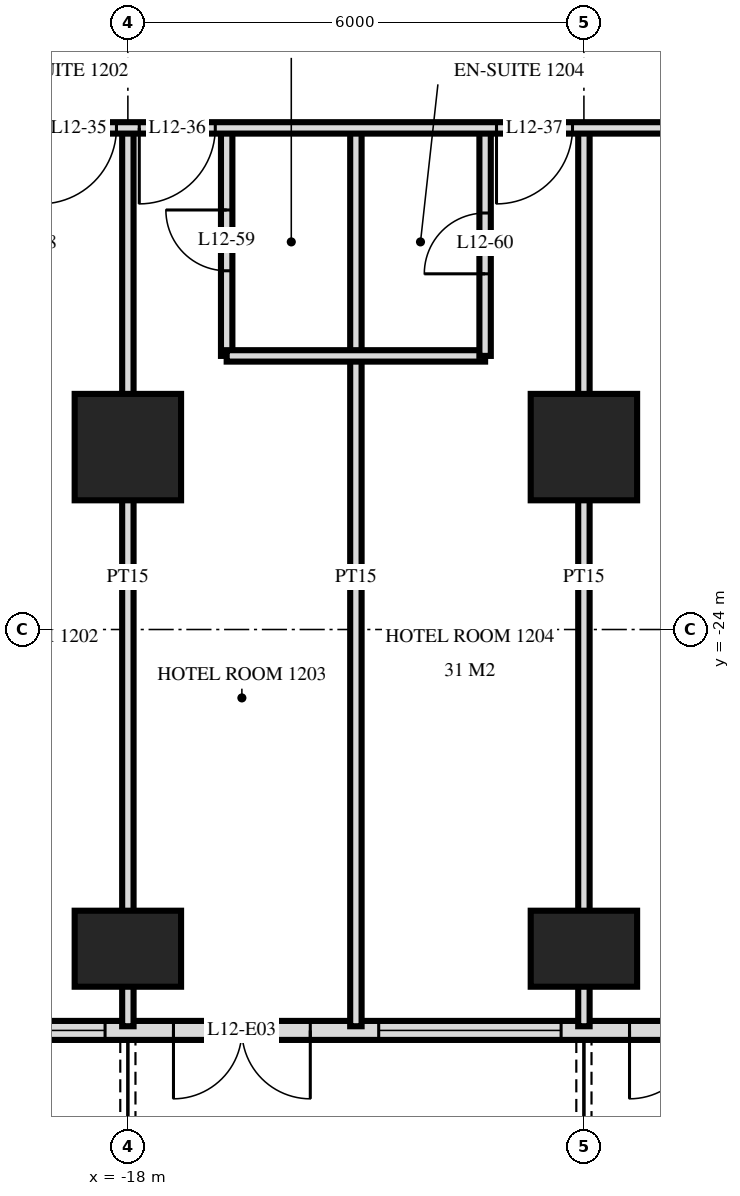
"""IFC4 building model, lengths in metres.
Left out: names, types, materials, properties, quantities, classifications, styles, units other than length and angle.
Written with IfcOpenShell. Run it as: python <this file> out.ifc"""

import sys

from ifc_helpers import new_model, si_unit, direction, frame, frame_2d, origin, origin_2d, place, context, subcontext, project, spatial, rectangle, extrude, element, fill, save


model = new_model("IFC4")
c1 = context("Model", 3, precision=1e-05, world=origin(), true_north=direction((0.0, 1.0)))
c2 = subcontext(c1, "Body", "Model", "MODEL_VIEW")
j1 = project(units=[si_unit("LENGTHUNIT", "METRE"), si_unit("PLANEANGLEUNIT", "RADIAN")], contexts=[c1])
p1 = place(None, origin())
s1 = spatial("IfcSite", under=j1, at=p1, CompositionType="ELEMENT")
p2 = place(p1, origin())
s2 = spatial("IfcBuilding", under=s1, at=p2, CompositionType="ELEMENT")
p3 = place(p2, frame((0.0, 0.0, 52.8)))
s3 = spatial("IfcBuildingStorey", under=s2, at=p3, CompositionType="ELEMENT", Elevation=52.8)
p4 = place(p3, frame((-18.0, -28.2, 0.0), z_axis=(0.0, 0.0, 1.0), x_axis=(1.0, 0.0, 0.0)))
e1 = element("IfcColumn", 1, at=p4, inside=s3, PredefinedType="COLUMN", context=c2, shape_type="SweptSolid", body=[
    extrude(rectangle(XDim=1.4, YDim=1.0, at=origin_2d()), origin(), (0.0, 0.0, 1.0), 3.6),
])
p5 = place(p3, frame((-18.0, -21.6, 0.0), z_axis=(0.0, 0.0, 1.0), x_axis=(1.0, 0.0, 0.0)))
e2 = element("IfcColumn", 2, at=p5, inside=s3, PredefinedType="COLUMN", context=c2, shape_type="SweptSolid", body=[
    extrude(rectangle(XDim=1.4, YDim=1.4, at=origin_2d()), origin(), (0.0, 0.0, 1.0), 3.6),
])
p6 = place(p3, frame((-12.0, -28.2, 0.0), z_axis=(0.0, 0.0, 1.0), x_axis=(1.0, 0.0, 0.0)))
e3 = element("IfcColumn", 3, at=p6, inside=s3, PredefinedType="COLUMN", context=c2, shape_type="SweptSolid", body=[
    extrude(rectangle(XDim=1.4, YDim=1.0, at=origin_2d()), origin(), (0.0, 0.0, 1.0), 3.6),
])
p7 = place(p3, frame((-12.0, -21.6, 0.0), z_axis=(0.0, 0.0, 1.0), x_axis=(1.0, 0.0, 0.0)))
e4 = element("IfcColumn", 4, at=p7, inside=s3, PredefinedType="COLUMN", context=c2, shape_type="SweptSolid", body=[
    extrude(rectangle(XDim=1.4, YDim=1.4, at=origin_2d()), origin(), (0.0, 0.0, 1.0), 3.6),
])
p8 = place(p3, frame((-28.775, -29.275, 0.0), z_axis=(0.0, 0.0, 1.0), x_axis=(1.0, 0.0, 0.0)))
e5 = element("IfcWall", 5, at=p8, inside=s3, PredefinedType="SOLIDWALL", context=c2, shape_type="SweptSolid", body=[
    extrude(rectangle(XDim=57.551, YDim=0.25, at=frame_2d((28.775, 0.0))), origin(), (0.0, 0.0, 1.0), 3.32),
])
p9 = place(p8, frame((0.575, 0.0, 0.0)))
e6 = element("IfcOpeningElement", 6, at=p9, cuts=e5, PredefinedType="OPENING", context=c2, shape_type="SweptSolid", body=[
    extrude(rectangle(XDim=1.8, YDim=2.4, at=frame_2d((0.9, 1.2))), frame((0.0, 0.135, 0.0), z_axis=(0.0, -1.0, 0.0), x_axis=(1.0, 0.0, 0.0)), (0.0, 0.0, 1.0), 0.27),
])
p10 = place(p8, frame((5.375, 0.0, 0.0)))
e7 = element("IfcOpeningElement", 7, at=p10, cuts=e5, PredefinedType="OPENING", context=c2, shape_type="SweptSolid", body=[
    extrude(rectangle(XDim=1.8, YDim=2.4, at=frame_2d((0.9, 1.2))), frame((0.0, 0.135, 0.0), z_axis=(0.0, -1.0, 0.0), x_axis=(1.0, 0.0, 0.0)), (0.0, 0.0, 1.0), 0.27),
])
p11 = place(p8, frame((8.075, 0.0, 0.3)))
e8 = element("IfcOpeningElement", 8, at=p11, cuts=e5, PredefinedType="OPENING", context=c2, shape_type="SweptSolid", body=[
    extrude(rectangle(XDim=2.4, YDim=2.1, at=frame_2d((1.2, 1.05))), frame((0.0, 0.135, 0.0), z_axis=(0.0, -1.0, 0.0), x_axis=(1.0, 0.0, 0.0)), (0.0, 0.0, 1.0), 0.27),
])
p12 = place(p8, frame((11.375, 0.0, 0.0)))
e9 = element("IfcOpeningElement", 9, at=p12, cuts=e5, PredefinedType="OPENING", context=c2, shape_type="SweptSolid", body=[
    extrude(rectangle(XDim=1.8, YDim=2.4, at=frame_2d((0.9, 1.2))), frame((0.0, 0.135, 0.0), z_axis=(0.0, -1.0, 0.0), x_axis=(1.0, 0.0, 0.0)), (0.0, 0.0, 1.0), 0.27),
])
p13 = place(p8, frame((14.075, 0.0, 0.3)))
e10 = element("IfcOpeningElement", 10, at=p13, cuts=e5, PredefinedType="OPENING", context=c2, shape_type="SweptSolid", body=[
    extrude(rectangle(XDim=2.4, YDim=2.1, at=frame_2d((1.2, 1.05))), frame((0.0, 0.135, 0.0), z_axis=(0.0, -1.0, 0.0), x_axis=(1.0, 0.0, 0.0)), (0.0, 0.0, 1.0), 0.27),
])
p14 = place(p8, frame((17.375, 0.0, 0.0)))
e11 = element("IfcOpeningElement", 11, at=p14, cuts=e5, PredefinedType="OPENING", context=c2, shape_type="SweptSolid", body=[
    extrude(rectangle(XDim=1.8, YDim=2.4, at=frame_2d((0.9, 1.2))), frame((0.0, 0.135, 0.0), z_axis=(0.0, -1.0, 0.0), x_axis=(1.0, 0.0, 0.0)), (0.0, 0.0, 1.0), 0.27),
])
p15 = place(p8, frame((20.075, 0.0, 0.3)))
e12 = element("IfcOpeningElement", 12, at=p15, cuts=e5, PredefinedType="OPENING", context=c2, shape_type="SweptSolid", body=[
    extrude(rectangle(XDim=2.4, YDim=2.1, at=frame_2d((1.2, 1.05))), frame((0.0, 0.135, 0.0), z_axis=(0.0, -1.0, 0.0), x_axis=(1.0, 0.0, 0.0)), (0.0, 0.0, 1.0), 0.27),
])
p16 = place(p8, frame((23.075, 0.0, 0.3)))
e13 = element("IfcOpeningElement", 13, at=p16, cuts=e5, PredefinedType="OPENING", context=c2, shape_type="SweptSolid", body=[
    extrude(rectangle(XDim=2.4, YDim=2.1, at=frame_2d((1.2, 1.05))), frame((0.0, 0.135, 0.0), z_axis=(0.0, -1.0, 0.0), x_axis=(1.0, 0.0, 0.0)), (0.0, 0.0, 1.0), 0.27),
])
p17 = place(p8, frame((26.375, 0.0, 0.0)))
e14 = element("IfcOpeningElement", 14, at=p17, cuts=e5, PredefinedType="OPENING", context=c2, shape_type="SweptSolid", body=[
    extrude(rectangle(XDim=1.8, YDim=2.4, at=frame_2d((0.9, 1.2))), frame((0.0, 0.135, 0.0), z_axis=(0.0, -1.0, 0.0), x_axis=(1.0, 0.0, 0.0)), (0.0, 0.0, 1.0), 0.27),
])
p18 = place(p8, frame((29.375, 0.0, 0.0)))
e15 = element("IfcOpeningElement", 15, at=p18, cuts=e5, PredefinedType="OPENING", context=c2, shape_type="SweptSolid", body=[
    extrude(rectangle(XDim=1.8, YDim=2.4, at=frame_2d((0.9, 1.2))), frame((0.0, 0.135, 0.0), z_axis=(0.0, -1.0, 0.0), x_axis=(1.0, 0.0, 0.0)), (0.0, 0.0, 1.0), 0.27),
])
p19 = place(p8, frame((32.075, 0.0, 0.3)))
e16 = element("IfcOpeningElement", 16, at=p19, cuts=e5, PredefinedType="OPENING", context=c2, shape_type="SweptSolid", body=[
    extrude(rectangle(XDim=2.4, YDim=2.1, at=frame_2d((1.2, 1.05))), frame((0.0, 0.135, 0.0), z_axis=(0.0, -1.0, 0.0), x_axis=(1.0, 0.0, 0.0)), (0.0, 0.0, 1.0), 0.27),
])
p20 = place(p8, frame((35.075, 0.0, 0.3)))
e17 = element("IfcOpeningElement", 17, at=p20, cuts=e5, PredefinedType="OPENING", context=c2, shape_type="SweptSolid", body=[
    extrude(rectangle(XDim=2.4, YDim=2.1, at=frame_2d((1.2, 1.05))), frame((0.0, 0.135, 0.0), z_axis=(0.0, -1.0, 0.0), x_axis=(1.0, 0.0, 0.0)), (0.0, 0.0, 1.0), 0.27),
])
p21 = place(p8, frame((38.375, 0.0, 0.0)))
e18 = element("IfcOpeningElement", 18, at=p21, cuts=e5, PredefinedType="OPENING", context=c2, shape_type="SweptSolid", body=[
    extrude(rectangle(XDim=1.8, YDim=2.4, at=frame_2d((0.9, 1.2))), frame((0.0, 0.135, 0.0), z_axis=(0.0, -1.0, 0.0), x_axis=(1.0, 0.0, 0.0)), (0.0, 0.0, 1.0), 0.27),
])
p22 = place(p8, frame((41.375, 0.0, 0.0)))
e19 = element("IfcOpeningElement", 19, at=p22, cuts=e5, PredefinedType="OPENING", context=c2, shape_type="SweptSolid", body=[
    extrude(rectangle(XDim=1.8, YDim=2.4, at=frame_2d((0.9, 1.2))), frame((0.0, 0.135, 0.0), z_axis=(0.0, -1.0, 0.0), x_axis=(1.0, 0.0, 0.0)), (0.0, 0.0, 1.0), 0.27),
])
p23 = place(p8, frame((44.075, 0.0, 0.3)))
e20 = element("IfcOpeningElement", 20, at=p23, cuts=e5, PredefinedType="OPENING", context=c2, shape_type="SweptSolid", body=[
    extrude(rectangle(XDim=2.4, YDim=2.1, at=frame_2d((1.2, 1.05))), frame((0.0, 0.135, 0.0), z_axis=(0.0, -1.0, 0.0), x_axis=(1.0, 0.0, 0.0)), (0.0, 0.0, 1.0), 0.27),
])
p24 = place(p8, frame((47.075, 0.0, 0.3)))
e21 = element("IfcOpeningElement", 21, at=p24, cuts=e5, PredefinedType="OPENING", context=c2, shape_type="SweptSolid", body=[
    extrude(rectangle(XDim=2.4, YDim=2.1, at=frame_2d((1.2, 1.05))), frame((0.0, 0.135, 0.0), z_axis=(0.0, -1.0, 0.0), x_axis=(1.0, 0.0, 0.0)), (0.0, 0.0, 1.0), 0.27),
])
p25 = place(p8, frame((50.375, 0.0, 0.0)))
e22 = element("IfcOpeningElement", 22, at=p25, cuts=e5, PredefinedType="OPENING", context=c2, shape_type="SweptSolid", body=[
    extrude(rectangle(XDim=1.8, YDim=2.4, at=frame_2d((0.9, 1.2))), frame((0.0, 0.135, 0.0), z_axis=(0.0, -1.0, 0.0), x_axis=(1.0, 0.0, 0.0)), (0.0, 0.0, 1.0), 0.27),
])
p26 = place(p8, frame((53.375, 0.0, 0.0)))
e23 = element("IfcOpeningElement", 23, at=p26, cuts=e5, PredefinedType="OPENING", context=c2, shape_type="SweptSolid", body=[
    extrude(rectangle(XDim=1.8, YDim=2.4, at=frame_2d((0.9, 1.2))), frame((0.0, 0.135, 0.0), z_axis=(0.0, -1.0, 0.0), x_axis=(1.0, 0.0, 0.0)), (0.0, 0.0, 1.0), 0.27),
])
p27 = place(p3, frame((-12.0, -29.22, 0.0), z_axis=(0.0, 0.0, 1.0), x_axis=(0.0, 1.0, 0.0)))
e24 = element("IfcWall", 24, at=p27, inside=s3, PredefinedType="PARTITIONING", context=c2, shape_type="SweptSolid", body=[
    extrude(rectangle(XDim=11.82, YDim=0.15, at=frame_2d((5.91, 0.0))), origin(), (0.0, 0.0, 1.0), 3.32),
])
p28 = place(p3, frame((-13.3, -20.4, 0.0), z_axis=(0.0, 0.0, 1.0), x_axis=(0.0, 1.0, 0.0)))
e25 = element("IfcWall", 25, at=p28, inside=s3, PredefinedType="PARTITIONING", context=c2, shape_type="SweptSolid", body=[
    extrude(rectangle(XDim=3.0, YDim=0.15, at=frame_2d((1.5, 0.0))), origin(), (0.0, 0.0, 1.0), 3.32),
])
p29 = place(p28, frame((1.08, 0.0, 0.0)))
e26 = element("IfcOpeningElement", 26, at=p29, cuts=e25, PredefinedType="OPENING", context=c2, shape_type="SweptSolid", body=[
    extrude(rectangle(XDim=0.8, YDim=2.1, at=frame_2d((0.4, 1.05))), frame((0.0, 0.085, 0.0), z_axis=(0.0, -1.0, 0.0), x_axis=(1.0, 0.0, 0.0)), (0.0, 0.0, 1.0), 0.17),
])
p30 = place(p3, frame((-15.0, -29.22, 0.0), z_axis=(0.0, 0.0, 1.0), x_axis=(0.0, 1.0, 0.0)))
e27 = element("IfcWall", 27, at=p30, inside=s3, PredefinedType="PARTITIONING", context=c2, shape_type="SweptSolid", body=[
    extrude(rectangle(XDim=11.82, YDim=0.15, at=frame_2d((5.91, 0.0))), origin(), (0.0, 0.0, 1.0), 3.32),
])
p31 = place(p3, frame((-16.7, -20.4, 0.0), z_axis=(0.0, 0.0, 1.0), x_axis=(0.0, 1.0, 0.0)))
e28 = element("IfcWall", 28, at=p31, inside=s3, PredefinedType="PARTITIONING", context=c2, shape_type="SweptSolid", body=[
    extrude(rectangle(XDim=3.0, YDim=0.15, at=frame_2d((1.5, 0.0))), origin(), (0.0, 0.0, 1.0), 3.32),
])
p32 = place(p31, frame((1.12, 0.0, 0.0)))
e29 = element("IfcOpeningElement", 29, at=p32, cuts=e28, PredefinedType="OPENING", context=c2, shape_type="SweptSolid", body=[
    extrude(rectangle(XDim=0.8, YDim=2.1, at=frame_2d((0.4, 1.05))), frame((0.0, 0.085, 0.0), z_axis=(0.0, -1.0, 0.0), x_axis=(1.0, 0.0, 0.0)), (0.0, 0.0, 1.0), 0.17),
])
p33 = place(p3, frame((-18.0, -29.22, 0.0), z_axis=(0.0, 0.0, 1.0), x_axis=(0.0, 1.0, 0.0)))
e30 = element("IfcWall", 30, at=p33, inside=s3, PredefinedType="PARTITIONING", context=c2, shape_type="SweptSolid", body=[
    extrude(rectangle(XDim=11.82, YDim=0.15, at=frame_2d((5.91, 0.0))), origin(), (0.0, 0.0, 1.0), 3.32),
])
p34 = place(p3, frame((-16.7, -20.4, 0.0), z_axis=(0.0, 0.0, 1.0), x_axis=(1.0, 0.0, 0.0)))
e31 = element("IfcWall", 31, at=p34, inside=s3, PredefinedType="PARTITIONING", context=c2, shape_type="SweptSolid", body=[
    extrude(rectangle(XDim=3.4, YDim=0.15, at=frame_2d((1.7, 0.0))), origin(), (0.0, 0.0, 1.0), 3.32),
])
p35 = place(p3, frame((-33.12, -17.4, 0.0), z_axis=(0.0, 0.0, 1.0), x_axis=(1.0, 0.0, 0.0)))
e32 = element("IfcWall", 32, at=p35, inside=s3, PredefinedType="PARTITIONING", context=c2, shape_type="SweptSolid", body=[
    extrude(rectangle(XDim=66.24, YDim=0.15, at=frame_2d((33.12, 0.0))), origin(), (0.0, 0.0, 1.0), 3.32),
])
p36 = place(p35, frame((9.27, 0.0, 0.0)))
e33 = element("IfcOpeningElement", 33, at=p36, cuts=e32, PredefinedType="OPENING", context=c2, shape_type="SweptSolid", body=[
    extrude(rectangle(XDim=1.0, YDim=2.1, at=frame_2d((0.5, 1.05))), frame((0.0, 0.085, 0.0), z_axis=(0.0, -1.0, 0.0), x_axis=(1.0, 0.0, 0.0)), (0.0, 0.0, 1.0), 0.17),
])
p37 = place(p35, frame((13.97, 0.0, 0.0)))
e34 = element("IfcOpeningElement", 34, at=p37, cuts=e32, PredefinedType="OPENING", context=c2, shape_type="SweptSolid", body=[
    extrude(rectangle(XDim=1.0, YDim=2.1, at=frame_2d((0.5, 1.05))), frame((0.0, 0.085, 0.0), z_axis=(0.0, -1.0, 0.0), x_axis=(1.0, 0.0, 0.0)), (0.0, 0.0, 1.0), 0.17),
])
p38 = place(p35, frame((15.27, 0.0, 0.0)))
e35 = element("IfcOpeningElement", 35, at=p38, cuts=e32, PredefinedType="OPENING", context=c2, shape_type="SweptSolid", body=[
    extrude(rectangle(XDim=1.0, YDim=2.1, at=frame_2d((0.5, 1.05))), frame((0.0, 0.085, 0.0), z_axis=(0.0, -1.0, 0.0), x_axis=(1.0, 0.0, 0.0)), (0.0, 0.0, 1.0), 0.17),
])
p39 = place(p35, frame((19.97, 0.0, 0.0)))
e36 = element("IfcOpeningElement", 36, at=p39, cuts=e32, PredefinedType="OPENING", context=c2, shape_type="SweptSolid", body=[
    extrude(rectangle(XDim=1.0, YDim=2.1, at=frame_2d((0.5, 1.05))), frame((0.0, 0.085, 0.0), z_axis=(0.0, -1.0, 0.0), x_axis=(1.0, 0.0, 0.0)), (0.0, 0.0, 1.0), 0.17),
])
p40 = place(p35, frame((22.27, 0.0, 0.0)))
e37 = element("IfcOpeningElement", 37, at=p40, cuts=e32, PredefinedType="OPENING", context=c2, shape_type="SweptSolid", body=[
    extrude(rectangle(XDim=1.0, YDim=2.1, at=frame_2d((0.5, 1.05))), frame((0.0, 0.085, 0.0), z_axis=(0.0, -1.0, 0.0), x_axis=(1.0, 0.0, 0.0)), (0.0, 0.0, 1.0), 0.17),
])
p41 = place(p35, frame((28.97, 0.0, 0.0)))
e38 = element("IfcOpeningElement", 38, at=p41, cuts=e32, PredefinedType="OPENING", context=c2, shape_type="SweptSolid", body=[
    extrude(rectangle(XDim=1.0, YDim=2.1, at=frame_2d((0.5, 1.05))), frame((0.0, 0.085, 0.0), z_axis=(0.0, -1.0, 0.0), x_axis=(1.0, 0.0, 0.0)), (0.0, 0.0, 1.0), 0.17),
])
p42 = place(p35, frame((30.27, 0.0, 0.0)))
e39 = element("IfcOpeningElement", 39, at=p42, cuts=e32, PredefinedType="OPENING", context=c2, shape_type="SweptSolid", body=[
    extrude(rectangle(XDim=1.0, YDim=2.1, at=frame_2d((0.5, 1.05))), frame((0.0, 0.085, 0.0), z_axis=(0.0, -1.0, 0.0), x_axis=(1.0, 0.0, 0.0)), (0.0, 0.0, 1.0), 0.17),
])
p43 = place(p35, frame((34.97, 0.0, 0.0)))
e40 = element("IfcOpeningElement", 40, at=p43, cuts=e32, PredefinedType="OPENING", context=c2, shape_type="SweptSolid", body=[
    extrude(rectangle(XDim=1.0, YDim=2.1, at=frame_2d((0.5, 1.05))), frame((0.0, 0.085, 0.0), z_axis=(0.0, -1.0, 0.0), x_axis=(1.0, 0.0, 0.0)), (0.0, 0.0, 1.0), 0.17),
])
p44 = place(p35, frame((36.27, 0.0, 0.0)))
e41 = element("IfcOpeningElement", 41, at=p44, cuts=e32, PredefinedType="OPENING", context=c2, shape_type="SweptSolid", body=[
    extrude(rectangle(XDim=1.0, YDim=2.1, at=frame_2d((0.5, 1.05))), frame((0.0, 0.085, 0.0), z_axis=(0.0, -1.0, 0.0), x_axis=(1.0, 0.0, 0.0)), (0.0, 0.0, 1.0), 0.17),
])
p45 = place(p35, frame((39.82, 0.0, 0.0)))
e42 = element("IfcOpeningElement", 42, at=p45, cuts=e32, PredefinedType="OPENING", context=c2, shape_type="SweptSolid", body=[
    extrude(rectangle(XDim=1.0, YDim=2.1, at=frame_2d((0.5, 1.05))), frame((0.0, 0.085, 0.0), z_axis=(0.0, -1.0, 0.0), x_axis=(1.0, 0.0, 0.0)), (0.0, 0.0, 1.0), 0.17),
])
p46 = place(p35, frame((51.27, 0.0, 0.0)))
e43 = element("IfcOpeningElement", 43, at=p46, cuts=e32, PredefinedType="OPENING", context=c2, shape_type="SweptSolid", body=[
    extrude(rectangle(XDim=1.0, YDim=2.1, at=frame_2d((0.5, 1.05))), frame((0.0, 0.085, 0.0), z_axis=(0.0, -1.0, 0.0), x_axis=(1.0, 0.0, 0.0)), (0.0, 0.0, 1.0), 0.17),
])
p47 = place(p35, frame((4.42, 0.0, 0.0)))
e44 = element("IfcOpeningElement", 44, at=p47, cuts=e32, PredefinedType="OPENING", context=c2, shape_type="SweptSolid", body=[
    extrude(rectangle(XDim=1.0, YDim=2.1, at=frame_2d((0.5, 1.05))), frame((0.0, 0.085, 0.0), z_axis=(0.0, -1.0, 0.0), x_axis=(1.0, 0.0, 0.0)), (0.0, 0.0, 1.0), 0.17),
])
p48 = place(p35, frame((54.82, 0.0, 0.0)))
e45 = element("IfcOpeningElement", 45, at=p48, cuts=e32, PredefinedType="OPENING", context=c2, shape_type="SweptSolid", body=[
    extrude(rectangle(XDim=1.0, YDim=2.1, at=frame_2d((0.5, 1.05))), frame((0.0, 0.085, 0.0), z_axis=(0.0, -1.0, 0.0), x_axis=(1.0, 0.0, 0.0)), (0.0, 0.0, 1.0), 0.17),
])
p49 = place(p11, origin())
e46 = element("IfcWindow", 46, at=p49, inside=s3, PartitioningType="SINGLE_PANEL", PredefinedType="WINDOW", context=c2, shape_type="SweptSolid", body=[
    extrude(rectangle(XDim=2.4, YDim=2.1, at=frame_2d((1.2, 1.05))), frame((0.0, 0.03, 0.0), z_axis=(0.0, -1.0, 0.0), x_axis=(1.0, 0.0, 0.0)), (0.0, 0.0, 1.0), 0.06),
])
fill(e8, e46)
p50 = place(p12, frame((0.9, 0.0, 0.0), z_axis=(0.0, 0.0, 1.0), x_axis=(-1.0, 0.0, 0.0)))
e47 = element("IfcDoor", 47, at=p50, inside=s3, OperationType="DOUBLE_DOOR_SINGLE_SWING", PredefinedType="DOOR", context=c2, shape_type="SweptSolid", body=[
    extrude(rectangle(XDim=1.8, YDim=2.4, at=frame_2d((0.0, 1.2))), frame((0.0, -0.025, 0.0), z_axis=(0.0, 1.0, 0.0), x_axis=(-1.0, 0.0, 0.0)), (0.0, 0.0, 1.0), 0.05),
])
fill(e9, e47)
p51 = place(p13, origin())
e48 = element("IfcWindow", 48, at=p51, inside=s3, PartitioningType="SINGLE_PANEL", PredefinedType="WINDOW", context=c2, shape_type="SweptSolid", body=[
    extrude(rectangle(XDim=2.4, YDim=2.1, at=frame_2d((1.2, 1.05))), frame((0.0, 0.03, 0.0), z_axis=(0.0, -1.0, 0.0), x_axis=(1.0, 0.0, 0.0)), (0.0, 0.0, 1.0), 0.06),
])
fill(e10, e48)
p52 = place(p14, frame((0.9, 0.0, 0.0), z_axis=(0.0, 0.0, 1.0), x_axis=(-1.0, 0.0, 0.0)))
e49 = element("IfcDoor", 49, at=p52, inside=s3, OperationType="DOUBLE_DOOR_SINGLE_SWING", PredefinedType="DOOR", context=c2, shape_type="SweptSolid", body=[
    extrude(rectangle(XDim=1.8, YDim=2.4, at=frame_2d((0.0, 1.2))), frame((0.0, -0.025, 0.0), z_axis=(0.0, 1.0, 0.0), x_axis=(-1.0, 0.0, 0.0)), (0.0, 0.0, 1.0), 0.05),
])
fill(e11, e49)
p53 = place(p37, frame((0.5, 0.0, 0.0), z_axis=(0.0, 0.0, 1.0), x_axis=(-1.0, 0.0, 0.0)))
e50 = element("IfcDoor", 50, at=p53, inside=s3, OperationType="SINGLE_SWING_LEFT", PredefinedType="DOOR", context=c2, shape_type="SweptSolid", body=[
    extrude(rectangle(XDim=1.0, YDim=2.1, at=frame_2d((0.0, 1.05))), frame((0.0, -0.025, 0.0), z_axis=(0.0, 1.0, 0.0), x_axis=(-1.0, 0.0, 0.0)), (0.0, 0.0, 1.0), 0.05),
])
fill(e34, e50)
p54 = place(p38, frame((0.5, 0.0, 0.0), z_axis=(0.0, 0.0, 1.0), x_axis=(-1.0, 0.0, 0.0)))
e51 = element("IfcDoor", 51, at=p54, inside=s3, OperationType="SINGLE_SWING_LEFT", PredefinedType="DOOR", context=c2, shape_type="SweptSolid", body=[
    extrude(rectangle(XDim=1.0, YDim=2.1, at=frame_2d((0.0, 1.05))), frame((0.0, -0.025, 0.0), z_axis=(0.0, 1.0, 0.0), x_axis=(-1.0, 0.0, 0.0)), (0.0, 0.0, 1.0), 0.05),
])
fill(e35, e51)
p55 = place(p39, frame((0.5, 0.0, 0.0), z_axis=(0.0, 0.0, 1.0), x_axis=(-1.0, 0.0, 0.0)))
e52 = element("IfcDoor", 52, at=p55, inside=s3, OperationType="SINGLE_SWING_LEFT", PredefinedType="DOOR", context=c2, shape_type="SweptSolid", body=[
    extrude(rectangle(XDim=1.0, YDim=2.1, at=frame_2d((0.0, 1.05))), frame((0.0, -0.025, 0.0), z_axis=(0.0, 1.0, 0.0), x_axis=(-1.0, 0.0, 0.0)), (0.0, 0.0, 1.0), 0.05),
])
fill(e36, e52)
p56 = place(p32, origin())
e53 = element("IfcDoor", 53, at=p56, inside=s3, OperationType="SINGLE_SWING_LEFT", PredefinedType="DOOR", context=c2, shape_type="SweptSolid", body=[
    extrude(rectangle(XDim=0.8, YDim=2.1, at=frame_2d((0.4, 1.05))), frame((0.0, 0.025, 0.0), z_axis=(0.0, -1.0, 0.0), x_axis=(1.0, 0.0, 0.0)), (0.0, 0.0, 1.0), 0.05),
])
fill(e29, e53)
p57 = place(p29, origin())
e54 = element("IfcDoor", 54, at=p57, inside=s3, OperationType="SINGLE_SWING_RIGHT", PredefinedType="DOOR", context=c2, shape_type="SweptSolid", body=[
    extrude(rectangle(XDim=0.8, YDim=2.1, at=frame_2d((0.4, 1.05))), frame((0.0, 0.025, 0.0), z_axis=(0.0, -1.0, 0.0), x_axis=(1.0, 0.0, 0.0)), (0.0, 0.0, 1.0), 0.05),
])
fill(e26, e54)
save(model, sys.argv[1])
